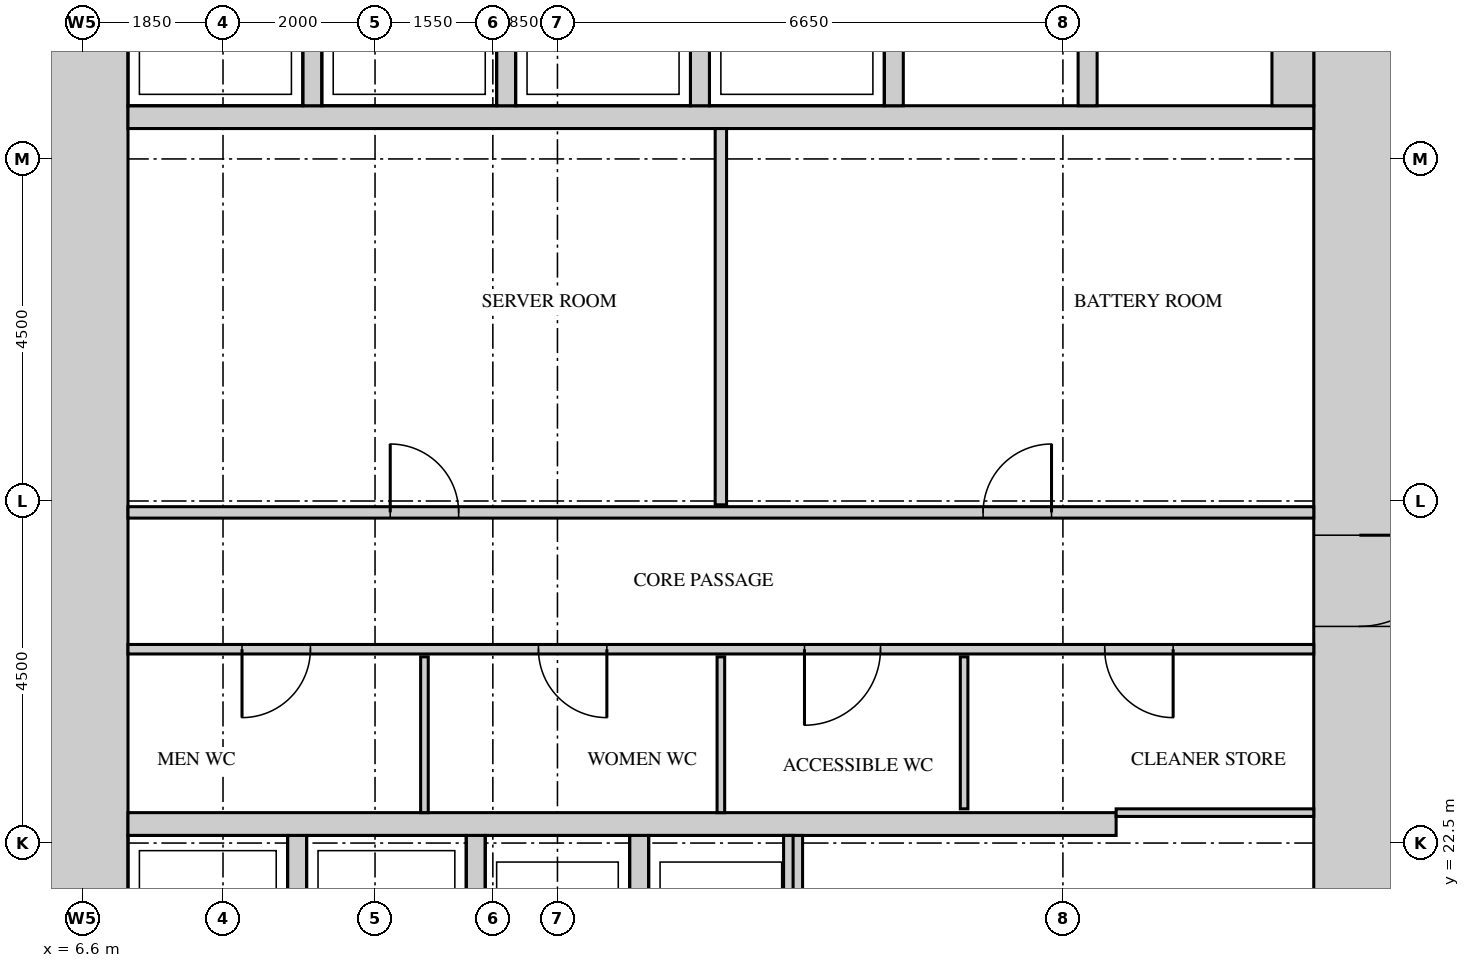
"""IFC4 building model, lengths in metres.
Left out: names, types, materials, properties, quantities, classifications, styles, units other than length and angle.
Written with IfcOpenShell. Run it as: python <this file> out.ifc"""

import sys

from ifc_helpers import new_model, si_unit, direction, frame, frame_2d, origin, place, context, subcontext, project, spatial, rectangle, extrude, source, transform, mapped, element, fill, save


model = new_model("IFC4")
c1 = context("Model", 3, precision=1e-05, world=origin(), true_north=direction((0.0, 1.0)))
c2 = subcontext(c1, "Body", "Model", "MODEL_VIEW")
j1 = project(units=[si_unit("LENGTHUNIT", "METRE"), si_unit("PLANEANGLEUNIT", "RADIAN")], contexts=[c1])
p1 = place(None, origin())
s1 = spatial("IfcSite", under=j1, at=p1, CompositionType="ELEMENT")
p2 = place(p1, origin())
s2 = spatial("IfcBuilding", under=s1, at=p2, CompositionType="ELEMENT")
p3 = place(p2, frame((0.0, 0.0, 64.5)))
s3 = spatial("IfcBuildingStorey", under=s2, at=p3, CompositionType="ELEMENT", Elevation=64.5)
m1 = source(origin(), c2, "Body", "SweptSolid", [
    extrude(rectangle(XDim=27.6, YDim=1.2, at=frame_2d((13.8, 0.0))), origin(), (0.0, 0.0, 1.0), 4.2),
])
p4 = place(p3, frame((23.4, 13.2, 0.0), z_axis=(0.0, 0.0, 1.0), x_axis=(0.0, 1.0, 0.0)))
e1 = element("IfcWall", 1, at=p4, inside=s3, PredefinedType="SHEAR", context=c2, shape_type="MappedRepresentation", body=[
    mapped(m1, transform((0.0, 0.0, 0.0))),
])
m2 = source(origin(), c2, "Body", "SweptSolid", [
    extrude(rectangle(XDim=1.8, YDim=2.1, at=frame_2d((0.9, 1.05))), frame((0.0, 0.61, 0.0), z_axis=(0.0, -1.0, 0.0), x_axis=(1.0, 0.0, 0.0)), (0.0, 0.0, 1.0), 1.22),
])
p5 = place(p4, frame((22.4, 0.0, 0.0)))
e2 = element("IfcOpeningElement", 2, at=p5, cuts=e1, PredefinedType="OPENING", context=c2, shape_type="MappedRepresentation", body=[
    mapped(m2, transform((0.0, 0.0, 0.0))),
])
m3 = source(origin(), c2, "Body", "SweptSolid", [
    extrude(rectangle(XDim=1.2, YDim=2.1, at=frame_2d((0.6, 1.05))), frame((0.0, 0.61, 0.0), z_axis=(0.0, -1.0, 0.0), x_axis=(1.0, 0.0, 0.0)), (0.0, 0.0, 1.0), 1.22),
])
p6 = place(p4, frame((12.15, 0.0, 0.0)))
e3 = element("IfcOpeningElement", 3, at=p6, cuts=e1, PredefinedType="OPENING", context=c2, shape_type="MappedRepresentation", body=[
    mapped(m3, transform((0.0, 0.0, 0.0))),
])
m4 = source(origin(), c2, "Body", "SweptSolid", [
    extrude(rectangle(XDim=0.9, YDim=2.1, at=frame_2d((0.45, 1.05))), frame((0.0, 0.61, 0.0), z_axis=(0.0, -1.0, 0.0), x_axis=(1.0, 0.0, 0.0)), (0.0, 0.0, 1.0), 1.22),
])
p7 = place(p4, frame((4.4, 0.0, 0.0)))
e4 = element("IfcOpeningElement", 4, at=p7, cuts=e1, PredefinedType="OPENING", context=c2, shape_type="MappedRepresentation", body=[
    mapped(m4, transform((0.0, 0.0, 0.0))),
])
p8 = place(p3, frame((6.6, 13.2, 0.0), z_axis=(0.0, 0.0, 1.0), x_axis=(0.0, 1.0, 0.0)))
e5 = element("IfcWall", 5, at=p8, inside=s3, PredefinedType="SHEAR", context=c2, shape_type="MappedRepresentation", body=[
    mapped(m1, transform((0.0, 0.0, 0.0))),
])
m5 = source(origin(), c2, "Body", "SweptSolid", [
    extrude(rectangle(XDim=13.0, YDim=0.3, at=frame_2d((6.5, 0.0))), origin(), (0.0, 0.0, 1.0), 4.2),
])
p9 = place(p3, frame((7.2, 22.75, 0.0), z_axis=(0.0, 0.0, 1.0), x_axis=(1.0, 0.0, 0.0)))
e6 = element("IfcWall", 6, at=p9, inside=s3, PredefinedType="STANDARD", context=c2, shape_type="MappedRepresentation", body=[
    mapped(m5, transform((0.0, 0.0, 0.0))),
])
m6 = source(origin(), c2, "Body", "SweptSolid", [
    extrude(rectangle(XDim=15.6, YDim=0.3, at=frame_2d((7.8, 0.0))), origin(), (0.0, 0.0, 1.0), 4.2),
])
p10 = place(p3, frame((7.2, 32.05, 0.0), z_axis=(0.0, 0.0, 1.0), x_axis=(1.0, 0.0, 0.0)))
e7 = element("IfcWall", 7, at=p10, inside=s3, PredefinedType="STANDARD", context=c2, shape_type="MappedRepresentation", body=[
    mapped(m6, transform((0.0, 0.0, 0.0))),
])
m7 = source(origin(), c2, "Body", "SweptSolid", [
    extrude(rectangle(XDim=3.1, YDim=0.25, at=frame_2d((1.55, 0.0))), origin(), (0.0, 0.0, 1.0), 4.2),
])
for number, where, z_axis, x_axis in (
    (8, (9.425, 19.5, 0.0), (0.0, 0.0, 1.0), (0.0, 1.0, 0.0)),
    (9, (11.775, 19.5, 0.0), (0.0, 0.0, 1.0), (0.0, 1.0, 0.0)),
    (10, (13.925, 19.5, 0.0), (0.0, 0.0, 1.0), (0.0, 1.0, 0.0)),
    (11, (15.95, 19.5, 0.0), (0.0, 0.0, 1.0), (0.0, 1.0, 0.0)),
):
    element("IfcWall", number, at=place(p3, frame(where, z_axis=z_axis, x_axis=x_axis)), inside=s3, PredefinedType="STANDARD", context=c2, shape_type="MappedRepresentation", body=[
        mapped(m7, transform((0.0, 0.0, 0.0))),
    ])
m8 = source(origin(), c2, "Body", "SweptSolid", [
    extrude(rectangle(XDim=2.4, YDim=0.25, at=frame_2d((1.2, 0.0))), origin(), (0.0, 0.0, 1.0), 4.2),
])
for number, where, z_axis, x_axis in (
    (12, (9.625, 32.2, 0.0), (0.0, 0.0, 1.0), (0.0, 1.0, 0.0)),
    (13, (12.175, 32.2, 0.0), (0.0, 0.0, 1.0), (0.0, 1.0, 0.0)),
    (14, (14.725, 32.2, 0.0), (0.0, 0.0, 1.0), (0.0, 1.0, 0.0)),
    (15, (17.275, 32.2, 0.0), (0.0, 0.0, 1.0), (0.0, 1.0, 0.0)),
    (16, (19.825, 32.2, 0.0), (0.0, 0.0, 1.0), (0.0, 1.0, 0.0)),
):
    element("IfcWall", number, at=place(p3, frame(where, z_axis=z_axis, x_axis=x_axis)), inside=s3, PredefinedType="STANDARD", context=c2, shape_type="MappedRepresentation", body=[
        mapped(m8, transform((0.0, 0.0, 0.0))),
    ])
m9 = source(origin(), c2, "Body", "SweptSolid", [
    extrude(rectangle(XDim=2.4, YDim=0.55, at=frame_2d((1.2, 0.0))), origin(), (0.0, 0.0, 1.0), 4.2),
])
p11 = place(p3, frame((22.525, 32.2, 0.0), z_axis=(0.0, 0.0, 1.0), x_axis=(0.0, 1.0, 0.0)))
e17 = element("IfcWall", 17, at=p11, inside=s3, PredefinedType="STANDARD", context=c2, shape_type="MappedRepresentation", body=[
    mapped(m9, transform((0.0, 0.0, 0.0))),
])
m10 = source(origin(), c2, "Body", "SweptSolid", [
    extrude(rectangle(XDim=2.05, YDim=0.1, at=frame_2d((1.025, 0.0))), origin(), (0.0, 0.0, 1.0), 4.3),
])
for number, where, z_axis, x_axis in (
    (18, (11.1, 22.9, 0.0), (0.0, 0.0, 1.0), (0.0, 1.0, 0.0)),
    (19, (15.0, 22.9, 0.0), (0.0, 0.0, 1.0), (0.0, 1.0, 0.0)),
):
    element("IfcWall", number, at=place(p3, frame(where, z_axis=z_axis, x_axis=x_axis)), inside=s3, PredefinedType="PARTITIONING", context=c2, shape_type="MappedRepresentation", body=[
        mapped(m10, transform((0.0, 0.0, 0.0))),
    ])
m11 = source(origin(), c2, "Body", "SweptSolid", [
    extrude(rectangle(XDim=2.6, YDim=0.1, at=frame_2d((1.3, 0.0))), origin(), (0.0, 0.0, 1.0), 4.3),
])
p12 = place(p3, frame((20.2, 22.9, 0.0), z_axis=(0.0, 0.0, 1.0), x_axis=(1.0, 0.0, 0.0)))
e20 = element("IfcWall", 20, at=p12, inside=s3, PredefinedType="PARTITIONING", context=c2, shape_type="MappedRepresentation", body=[
    mapped(m11, transform((0.0, 0.0, 0.0))),
])
m12 = source(origin(), c2, "Body", "SweptSolid", [
    extrude(rectangle(XDim=2.0, YDim=0.1, at=frame_2d((1.0, 0.0))), origin(), (0.0, 0.0, 1.0), 4.3),
])
p13 = place(p3, frame((18.2, 22.95, 0.0), z_axis=(0.0, 0.0, 1.0), x_axis=(0.0, 1.0, 0.0)))
e21 = element("IfcWall", 21, at=p13, inside=s3, PredefinedType="PARTITIONING", context=c2, shape_type="MappedRepresentation", body=[
    mapped(m12, transform((0.0, 0.0, 0.0))),
])
m13 = source(origin(), c2, "Body", "SweptSolid", [
    extrude(rectangle(XDim=15.6, YDim=0.125, at=frame_2d((7.8, 0.0))), origin(), (0.0, 0.0, 1.0), 4.3),
])
p14 = place(p3, frame((7.2, 25.05, 0.0), z_axis=(0.0, 0.0, 1.0), x_axis=(1.0, 0.0, 0.0)))
e22 = element("IfcWall", 22, at=p14, inside=s3, PredefinedType="PARTITIONING", context=c2, shape_type="MappedRepresentation", body=[
    mapped(m13, transform((0.0, 0.0, 0.0))),
])
m14 = source(origin(), c2, "Body", "SweptSolid", [
    extrude(rectangle(XDim=0.9, YDim=2.1, at=frame_2d((0.45, 1.05))), frame((0.0, 0.073, 0.0), z_axis=(0.0, -1.0, 0.0), x_axis=(1.0, 0.0, 0.0)), (0.0, 0.0, 1.0), 0.145),
])
p15 = place(p14, frame((1.5, 0.0, 0.0)))
e23 = element("IfcOpeningElement", 23, at=p15, cuts=e22, PredefinedType="OPENING", context=c2, shape_type="MappedRepresentation", body=[
    mapped(m14, transform((0.0, 0.0, 0.0))),
])
p16 = place(p14, frame((5.4, 0.0, 0.0)))
e24 = element("IfcOpeningElement", 24, at=p16, cuts=e22, PredefinedType="OPENING", context=c2, shape_type="MappedRepresentation", body=[
    mapped(m14, transform((0.0, 0.0, 0.0))),
])
m15 = source(origin(), c2, "Body", "SweptSolid", [
    extrude(rectangle(XDim=1.0, YDim=2.1, at=frame_2d((0.5, 1.05))), frame((0.0, 0.073, 0.0), z_axis=(0.0, -1.0, 0.0), x_axis=(1.0, 0.0, 0.0)), (0.0, 0.0, 1.0), 0.145),
])
p17 = place(p14, frame((8.9, 0.0, 0.0)))
e25 = element("IfcOpeningElement", 25, at=p17, cuts=e22, PredefinedType="OPENING", context=c2, shape_type="MappedRepresentation", body=[
    mapped(m15, transform((0.0, 0.0, 0.0))),
])
p18 = place(p14, frame((12.85, 0.0, 0.0)))
e26 = element("IfcOpeningElement", 26, at=p18, cuts=e22, PredefinedType="OPENING", context=c2, shape_type="MappedRepresentation", body=[
    mapped(m14, transform((0.0, 0.0, 0.0))),
])
m16 = source(origin(), c2, "Body", "SweptSolid", [
    extrude(rectangle(XDim=15.6, YDim=0.15, at=frame_2d((7.8, 0.0))), origin(), (0.0, 0.0, 1.0), 4.3),
])
p19 = place(p3, frame((7.2, 26.85, 0.0), z_axis=(0.0, 0.0, 1.0), x_axis=(1.0, 0.0, 0.0)))
e27 = element("IfcWall", 27, at=p19, inside=s3, PredefinedType="PARTITIONING", context=c2, shape_type="MappedRepresentation", body=[
    mapped(m16, transform((0.0, 0.0, 0.0))),
])
m17 = source(origin(), c2, "Body", "SweptSolid", [
    extrude(rectangle(XDim=0.9, YDim=2.1, at=frame_2d((0.45, 1.05))), frame((0.0, 0.085, 0.0), z_axis=(0.0, -1.0, 0.0), x_axis=(1.0, 0.0, 0.0)), (0.0, 0.0, 1.0), 0.17),
])
p20 = place(p19, frame((3.45, 0.0, 0.0)))
e28 = element("IfcOpeningElement", 28, at=p20, cuts=e27, PredefinedType="OPENING", context=c2, shape_type="MappedRepresentation", body=[
    mapped(m17, transform((0.0, 0.0, 0.0))),
])
p21 = place(p19, frame((11.25, 0.0, 0.0)))
e29 = element("IfcOpeningElement", 29, at=p21, cuts=e27, PredefinedType="OPENING", context=c2, shape_type="MappedRepresentation", body=[
    mapped(m17, transform((0.0, 0.0, 0.0))),
])
m18 = source(origin(), c2, "Body", "SweptSolid", [
    extrude(rectangle(XDim=4.95, YDim=0.15, at=frame_2d((2.475, 0.0))), origin(), (0.0, 0.0, 1.0), 4.3),
])
p22 = place(p3, frame((15.0, 26.95, 0.0), z_axis=(0.0, 0.0, 1.0), x_axis=(0.0, 1.0, 0.0)))
e30 = element("IfcWall", 30, at=p22, inside=s3, PredefinedType="PARTITIONING", context=c2, shape_type="MappedRepresentation", body=[
    mapped(m18, transform((0.0, 0.0, 0.0))),
])
m19 = source(origin(), c2, "Body", "SweptSolid", [
    extrude(rectangle(XDim=1.2, YDim=2.1, at=frame_2d((0.6, 1.05))), frame((0.0, 0.55, 0.0), z_axis=(0.0, -1.0, 0.0), x_axis=(1.0, 0.0, 0.0)), (0.0, 0.0, 1.0), 1.1),
])
p23 = place(p6, origin())
e31 = element("IfcDoor", 31, at=p23, inside=s3, OperationType="SINGLE_SWING_RIGHT", PredefinedType="DOOR", context=c2, shape_type="MappedRepresentation", body=[
    mapped(m19, transform((0.0, 0.0, 0.0))),
])
fill(e3, e31)
m20 = source(origin(), c2, "Body", "SweptSolid", [
    extrude(rectangle(XDim=0.9, YDim=2.1, at=frame_2d((0.45, 1.05))), frame((0.0, 0.025, 0.0), z_axis=(0.0, -1.0, 0.0), x_axis=(1.0, 0.0, 0.0)), (0.0, 0.0, 1.0), 0.05),
])
p24 = place(p20, origin())
e32 = element("IfcDoor", 32, at=p24, inside=s3, OperationType="SINGLE_SWING_RIGHT", PredefinedType="DOOR", context=c2, shape_type="MappedRepresentation", body=[
    mapped(m20, transform((0.0, 0.0, 0.0))),
])
fill(e28, e32)
p25 = place(p21, origin())
e33 = element("IfcDoor", 33, at=p25, inside=s3, OperationType="SINGLE_SWING_LEFT", PredefinedType="DOOR", context=c2, shape_type="MappedRepresentation", body=[
    mapped(m20, transform((0.0, 0.0, 0.0))),
])
fill(e29, e33)
p26 = place(p15, origin())
e34 = element("IfcDoor", 34, at=p26, inside=s3, OperationType="SINGLE_SWING_LEFT", PredefinedType="DOOR", context=c2, shape_type="MappedRepresentation", body=[
    mapped(m20, transform((0.0, 0.0, 0.0))),
])
fill(e23, e34)
p27 = place(p16, origin())
e35 = element("IfcDoor", 35, at=p27, inside=s3, OperationType="SINGLE_SWING_RIGHT", PredefinedType="DOOR", context=c2, shape_type="MappedRepresentation", body=[
    mapped(m20, transform((0.0, 0.0, 0.0))),
])
fill(e24, e35)
m21 = source(origin(), c2, "Body", "SweptSolid", [
    extrude(rectangle(XDim=1.0, YDim=2.1, at=frame_2d((0.5, 1.05))), frame((0.0, 0.025, 0.0), z_axis=(0.0, -1.0, 0.0), x_axis=(1.0, 0.0, 0.0)), (0.0, 0.0, 1.0), 0.05),
])
p28 = place(p17, origin())
e36 = element("IfcDoor", 36, at=p28, inside=s3, OperationType="SINGLE_SWING_LEFT", PredefinedType="DOOR", context=c2, shape_type="MappedRepresentation", body=[
    mapped(m21, transform((0.0, 0.0, 0.0))),
])
fill(e25, e36)
p29 = place(p18, origin())
e37 = element("IfcDoor", 37, at=p29, inside=s3, OperationType="SINGLE_SWING_RIGHT", PredefinedType="DOOR", context=c2, shape_type="MappedRepresentation", body=[
    mapped(m20, transform((0.0, 0.0, 0.0))),
])
fill(e26, e37)
save(model, sys.argv[1])
